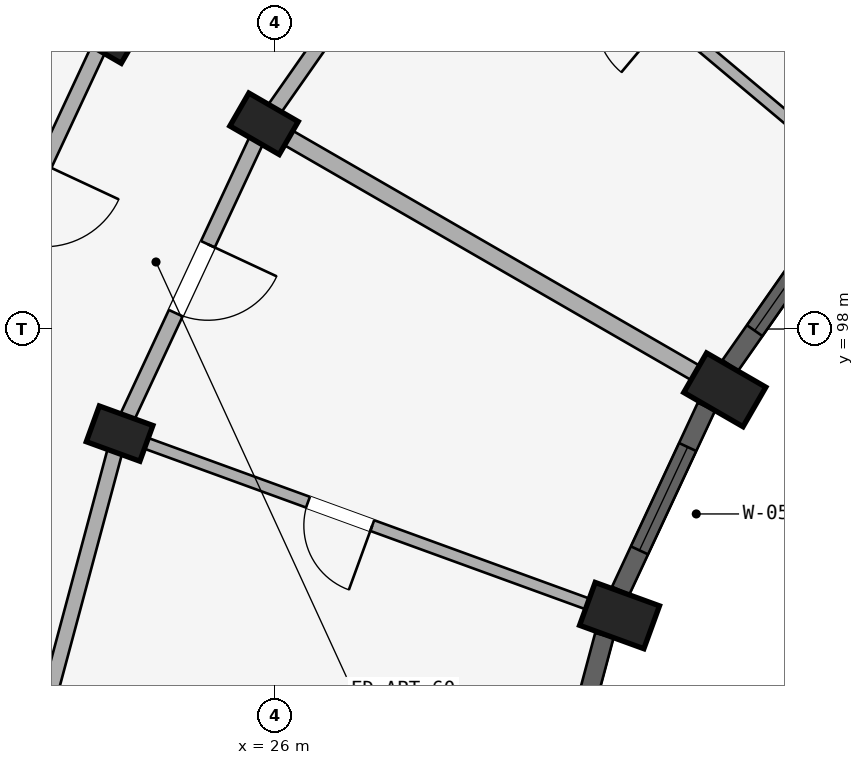
"""IFC4 building model, lengths in metres.
Left out: names, types, materials, properties, quantities, classifications, styles, units other than length and angle.
Written with IfcOpenShell. Run it as: python <this file> out.ifc"""

import sys

from ifc_helpers import new_model, si_unit, direction, frame, frame_2d, origin, origin_2d, place, context, subcontext, project, spatial, rectangle, extrude, element, fill, save


model = new_model("IFC4")
c1 = context("Model", 3, precision=1e-05, world=origin(), true_north=direction((0.0, 1.0)))
c2 = subcontext(c1, "Body", "Model", "MODEL_VIEW")
j1 = project(units=[si_unit("LENGTHUNIT", "METRE"), si_unit("PLANEANGLEUNIT", "RADIAN")], contexts=[c1])
p1 = place(None, origin())
s1 = spatial("IfcSite", under=j1, at=p1, CompositionType="ELEMENT")
p2 = place(p1, origin())
s2 = spatial("IfcBuilding", under=s1, at=p2, CompositionType="ELEMENT")
p3 = place(p2, frame((0.0, 0.0, 4.5)))
s3 = spatial("IfcBuildingStorey", under=s2, at=p3, CompositionType="ELEMENT", Elevation=4.5)
p4 = place(p3, frame((31.919, 97.2, 0.0), z_axis=(0.0, 0.0, 1.0), x_axis=(0.5, 0.866025403784, 0.0)))
e1 = element("IfcColumn", 1, at=p4, inside=s3, PredefinedType="COLUMN", context=c2, shape_type="SweptSolid", body=[
    extrude(rectangle(XDim=0.6, YDim=0.9, at=origin_2d()), origin(), (0.0, 0.0, 1.0), 3.98),
])
for number, where, z_axis, x_axis in (
    (2, (25.856, 100.7, 0.0), (0.0, 0.0, 1.0), (0.5, 0.866, 0.0)),
    (3, (23.778, 101.9, 0.0), (0.0, 0.0, 1.0), (0.5, 0.866, 0.0)),
):
    element("IfcColumn", number, at=place(p3, frame(where, z_axis=z_axis, x_axis=x_axis)), inside=s3, PredefinedType="COLUMN", context=c2, shape_type="SweptSolid", body=[
        extrude(rectangle(XDim=0.5, YDim=0.75, at=origin_2d()), origin(), (0.0, 0.0, 1.0), 3.98),
    ])
p5 = place(p3, frame((30.534, 94.23, 0.0), z_axis=(0.0, 0.0, 1.0), x_axis=(0.342020143326, 0.939692620786, 0.0)))
e4 = element("IfcColumn", 4, at=p5, inside=s3, PredefinedType="COLUMN", context=c2, shape_type="SweptSolid", body=[
    extrude(rectangle(XDim=0.6, YDim=0.9, at=origin_2d()), origin(), (0.0, 0.0, 1.0), 3.98),
])
p6 = place(p3, frame((23.956, 96.624, 0.0), z_axis=(0.0, 0.0, 1.0), x_axis=(0.342020143326, 0.939692620786, 0.0)))
e5 = element("IfcColumn", 5, at=p6, inside=s3, PredefinedType="COLUMN", context=c2, shape_type="SweptSolid", body=[
    extrude(rectangle(XDim=0.5, YDim=0.75, at=origin_2d()), origin(), (0.0, 0.0, 1.0), 3.98),
])
p7 = place(p3, frame((28.436, 104.384, 0.0), z_axis=(0.0, 0.0, 1.0), x_axis=(-0.573571637217, -0.819155404658, 0.0)))
e6 = element("IfcWall", 6, at=p7, inside=s3, PredefinedType="STANDARD", context=c2, shape_type="SweptSolid", body=[
    extrude(rectangle(XDim=4.497, YDim=0.2, at=frame_2d((2.249, 0.0))), origin(), (0.0, 0.0, 1.0), 3.322),
])
p8 = place(p3, frame((25.856, 100.7, 0.0), z_axis=(0.0, 0.0, 1.0), x_axis=(-0.422617978463, -0.906307919131, 0.0)))
e7 = element("IfcWall", 7, at=p8, inside=s3, PredefinedType="STANDARD", context=c2, shape_type="SweptSolid", body=[
    extrude(rectangle(XDim=4.497, YDim=0.2, at=frame_2d((2.249, 0.0))), origin(), (0.0, 0.0, 1.0), 3.322),
])
p9 = place(p8, frame((1.749, 0.0, 0.0)))
e8 = element("IfcOpeningElement", 8, at=p9, cuts=e7, PredefinedType="OPENING", context=c2, shape_type="SweptSolid", body=[
    extrude(rectangle(XDim=1.0, YDim=2.15, at=frame_2d((0.5, 1.075))), frame((0.0, 0.11, 0.0), z_axis=(0.0, -1.0, 0.0), x_axis=(1.0, 0.0, 0.0)), (0.0, 0.0, 1.0), 0.22),
])
p10 = place(p3, frame((23.778, 101.9, 0.0), z_axis=(0.0, 0.0, 1.0), x_axis=(-0.422629854778, -0.906302381024, 0.0)))
e9 = element("IfcWall", 9, at=p10, inside=s3, PredefinedType="STANDARD", context=c2, shape_type="SweptSolid", body=[
    extrude(rectangle(XDim=4.915, YDim=0.2, at=frame_2d((2.458, 0.0))), origin(), (0.0, 0.0, 1.0), 3.322),
])
p11 = place(p10, frame((1.918, 0.0, 0.0)))
e10 = element("IfcOpeningElement", 10, at=p11, cuts=e9, PredefinedType="OPENING", context=c2, shape_type="SweptSolid", body=[
    extrude(rectangle(XDim=1.08, YDim=2.15, at=frame_2d((0.54, 1.075))), frame((0.0, 0.11, 0.0), z_axis=(0.0, -1.0, 0.0), x_axis=(1.0, 0.0, 0.0)), (0.0, 0.0, 1.0), 0.22),
])
p12 = place(p3, frame((23.956, 96.624, 0.0), z_axis=(0.0, 0.0, 1.0), x_axis=(-0.258787642463, -0.965934240054, 0.0)))
e11 = element("IfcWall", 11, at=p12, inside=s3, PredefinedType="STANDARD", context=c2, shape_type="SweptSolid", body=[
    extrude(rectangle(XDim=4.497, YDim=0.2, at=frame_2d((2.249, 0.0))), origin(), (0.0, 0.0, 1.0), 3.322),
])
p13 = place(p3, frame((33.645, 100.013, 0.0), z_axis=(0.0, 0.0, 1.0), x_axis=(-0.766046761698, 0.642784846501, 0.0)))
e12 = element("IfcWall", 12, at=p13, inside=s3, PredefinedType="PARTITIONING", context=c2, shape_type="SweptSolid", body=[
    extrude(rectangle(XDim=6.75, YDim=0.15, at=frame_2d((3.375, 0.0))), origin(), (0.0, 0.0, 1.0), 3.322),
])
p14 = place(p13, frame((3.242, 0.0, 0.0)))
e13 = element("IfcOpeningElement", 13, at=p14, cuts=e12, PredefinedType="OPENING", context=c2, shape_type="SweptSolid", body=[
    extrude(rectangle(XDim=0.94, YDim=2.1, at=frame_2d((0.47, 1.05))), frame((0.0, 0.085, 0.0), z_axis=(0.0, -1.0, 0.0), x_axis=(1.0, 0.0, 0.0)), (0.0, 0.0, 1.0), 0.17),
])
p15 = place(p3, frame((31.746, 97.3, 0.0), z_axis=(0.0, 0.0, 1.0), x_axis=(-0.866026575979, 0.499997969693, 0.0)))
e14 = element("IfcWall", 14, at=p15, inside=s3, PredefinedType="STANDARD", context=c2, shape_type="SweptSolid", body=[
    extrude(rectangle(XDim=6.75, YDim=0.22, at=frame_2d((3.375, 0.0))), origin(), (0.0, 0.0, 1.0), 3.322),
])
p16 = place(p3, frame((30.346, 94.298, 0.0), z_axis=(0.0, 0.0, 1.0), x_axis=(-0.939696231917, 0.342010221662, 0.0)))
e15 = element("IfcWall", 15, at=p16, inside=s3, PredefinedType="PARTITIONING", context=c2, shape_type="SweptSolid", body=[
    extrude(rectangle(XDim=6.75, YDim=0.15, at=frame_2d((3.375, 0.0))), origin(), (0.0, 0.0, 1.0), 3.322),
])
p17 = place(p16, frame((3.262, 0.0, 0.0)))
e16 = element("IfcOpeningElement", 16, at=p17, cuts=e15, PredefinedType="OPENING", context=c2, shape_type="SweptSolid", body=[
    extrude(rectangle(XDim=0.9, YDim=2.1, at=frame_2d((0.45, 1.05))), frame((0.0, 0.085, 0.0), z_axis=(0.0, -1.0, 0.0), x_axis=(1.0, 0.0, 0.0)), (0.0, 0.0, 1.0), 0.17),
])
p18 = place(p3, frame((33.522, 99.707, 0.0), z_axis=(0.0, 0.0, 1.0), x_axis=(-0.573591230309, -0.819141685249, 0.0)))
e17 = element("IfcWall", 17, at=p18, inside=s3, PredefinedType="STANDARD", context=c2, shape_type="SweptSolid", body=[
    extrude(rectangle(XDim=2.67, YDim=0.25, at=frame_2d((1.335, 0.0))), origin(), (0.0, 0.0, 1.0), 3.472),
])
p19 = place(p18, frame((0.56, 0.0, 0.88)))
e18 = element("IfcOpeningElement", 18, at=p19, cuts=e17, PredefinedType="OPENING", context=c2, shape_type="SweptSolid", body=[
    extrude(rectangle(XDim=1.55, YDim=1.6, at=frame_2d((0.775, 0.8))), frame((0.0, 0.135, 0.0), z_axis=(0.0, -1.0, 0.0), x_axis=(1.0, 0.0, 0.0)), (0.0, 0.0, 1.0), 0.27),
])
p20 = place(p3, frame((31.677, 96.978, 0.0), z_axis=(0.0, 0.0, 1.0), x_axis=(-0.422610081738, -0.90631160139, 0.0)))
e19 = element("IfcWall", 19, at=p20, inside=s3, PredefinedType="STANDARD", context=c2, shape_type="SweptSolid", body=[
    extrude(rectangle(XDim=2.669, YDim=0.25, at=frame_2d((1.335, 0.0))), origin(), (0.0, 0.0, 1.0), 3.472),
])
p21 = place(p20, frame((0.585, 0.0, 0.88)))
e20 = element("IfcOpeningElement", 20, at=p21, cuts=e19, PredefinedType="OPENING", context=c2, shape_type="SweptSolid", body=[
    extrude(rectangle(XDim=1.5, YDim=1.65, at=frame_2d((0.75, 0.825))), frame((0.0, 0.135, 0.0), z_axis=(0.0, -1.0, 0.0), x_axis=(1.0, 0.0, 0.0)), (0.0, 0.0, 1.0), 0.27),
])
p22 = place(p3, frame((30.334, 93.969, 0.0), z_axis=(0.0, 0.0, 1.0), x_axis=(-0.258812272661, -0.965927640934, 0.0)))
e21 = element("IfcWall", 21, at=p22, inside=s3, PredefinedType="STANDARD", context=c2, shape_type="SweptSolid", body=[
    extrude(rectangle(XDim=2.67, YDim=0.25, at=frame_2d((1.335, 0.0))), origin(), (0.0, 0.0, 1.0), 3.472),
])
p23 = place(p22, frame((0.735, 0.0, 0.88)))
e22 = element("IfcOpeningElement", 22, at=p23, cuts=e21, PredefinedType="OPENING", context=c2, shape_type="SweptSolid", body=[
    extrude(rectangle(XDim=1.2, YDim=1.5, at=frame_2d((0.6, 0.75))), frame((0.0, 0.135, 0.0), z_axis=(0.0, -1.0, 0.0), x_axis=(1.0, 0.0, 0.0)), (0.0, 0.0, 1.0), 0.27),
])
p24 = place(p19, origin())
e23 = element("IfcWindow", 23, at=p24, inside=s3, PartitioningType="DOUBLE_PANEL_VERTICAL", PredefinedType="WINDOW", context=c2, shape_type="SweptSolid", body=[
    extrude(rectangle(XDim=1.55, YDim=1.6, at=frame_2d((0.775, 0.8))), frame((0.0, 0.03, 0.0), z_axis=(0.0, -1.0, 0.0), x_axis=(1.0, 0.0, 0.0)), (0.0, 0.0, 1.0), 0.06),
])
fill(e18, e23)
p25 = place(p21, origin())
e24 = element("IfcWindow", 24, at=p25, inside=s3, PartitioningType="DOUBLE_PANEL_VERTICAL", PredefinedType="WINDOW", context=c2, shape_type="SweptSolid", body=[
    extrude(rectangle(XDim=1.5, YDim=1.65, at=frame_2d((0.75, 0.825))), frame((0.0, 0.03, 0.0), z_axis=(0.0, -1.0, 0.0), x_axis=(1.0, 0.0, 0.0)), (0.0, 0.0, 1.0), 0.06),
])
fill(e20, e24)
p26 = place(p17, origin())
e25 = element("IfcDoor", 25, at=p26, inside=s3, OperationType="SINGLE_SWING_LEFT", PredefinedType="DOOR", context=c2, shape_type="SweptSolid", body=[
    extrude(rectangle(XDim=0.9, YDim=2.1, at=frame_2d((0.45, 1.05))), frame((0.0, 0.025, 0.0), z_axis=(0.0, -1.0, 0.0), x_axis=(1.0, 0.0, 0.0)), (0.0, 0.0, 1.0), 0.05),
])
fill(e16, e25)
p27 = place(p9, origin())
e26 = element("IfcDoor", 26, at=p27, inside=s3, OperationType="SINGLE_SWING_LEFT", PredefinedType="DOOR", context=c2, shape_type="SweptSolid", body=[
    extrude(rectangle(XDim=1.0, YDim=2.15, at=frame_2d((0.5, 1.075))), frame((0.0, 0.025, 0.0), z_axis=(0.0, -1.0, 0.0), x_axis=(1.0, 0.0, 0.0)), (0.0, 0.0, 1.0), 0.05),
])
fill(e8, e26)
save(model, sys.argv[1])
